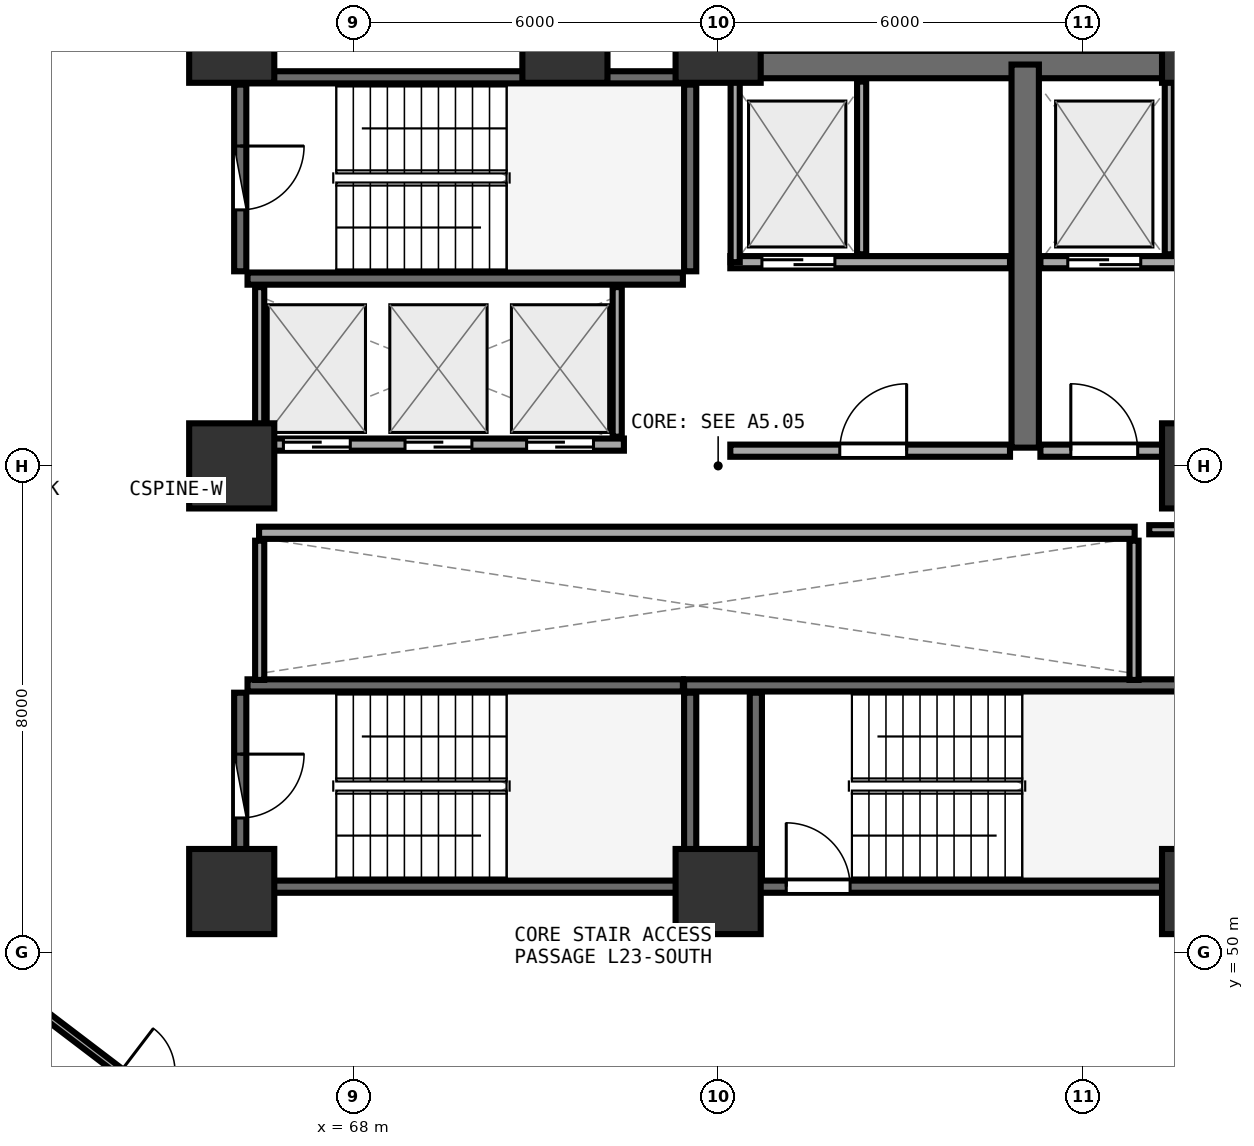
"""IFC4 building model, lengths in metres.
Left out: names, types, materials, properties, quantities, classifications, styles, units other than length and angle.
Written with IfcOpenShell. Run it as: python <this file> out.ifc"""

import sys

from ifc_helpers import new_model, si_unit, direction, frame, frame_2d, origin, origin_2d, place, context, subcontext, project, spatial, rectangle, extrude, element, fill, save


model = new_model("IFC4")
c1 = context("Model", 3, precision=1e-05, world=origin(), true_north=direction((0.0, 1.0)))
c2 = subcontext(c1, "Body", "Model", "MODEL_VIEW")
j1 = project(units=[si_unit("LENGTHUNIT", "METRE"), si_unit("PLANEANGLEUNIT", "RADIAN")], contexts=[c1])
p1 = place(None, origin())
s1 = spatial("IfcSite", under=j1, at=p1, CompositionType="ELEMENT")
p2 = place(p1, origin())
s2 = spatial("IfcBuilding", under=s1, at=p2, CompositionType="ELEMENT")
p3 = place(p2, frame((0.0, 0.0, 91.35)))
s3 = spatial("IfcBuildingStorey", under=s2, at=p3, CompositionType="ELEMENT", Elevation=91.35)
for number, where, z_axis, x_axis in (
    (1, (66.0, 51.0, 0.0), (0.0, 0.0, 1.0), (1.0, 0.0, 0.0)),
    (2, (74.0, 51.0, 0.0), (0.0, 0.0, 1.0), (1.0, 0.0, 0.0)),
    (3, (82.0, 51.0, 0.0), (0.0, 0.0, 1.0), (1.0, 0.0, 0.0)),
    (4, (82.0, 58.0, 0.0), (0.0, 0.0, 1.0), (1.0, 0.0, 0.0)),
    (5, (82.0, 65.0, 0.0), (0.0, 0.0, 1.0), (1.0, 0.0, 0.0)),
    (6, (74.0, 65.0, 0.0), (0.0, 0.0, 1.0), (1.0, 0.0, 0.0)),
    (7, (71.48, 65.0, 0.0), (0.0, 0.0, 1.0), (1.0, 0.0, 0.0)),
    (8, (66.0, 65.0, 0.0), (0.0, 0.0, 1.0), (1.0, 0.0, 0.0)),
    (9, (66.0, 58.0, 0.0), (0.0, 0.0, 1.0), (1.0, 0.0, 0.0)),
):
    element("IfcColumn", number, at=place(p3, frame(where, z_axis=z_axis, x_axis=x_axis)), inside=s3, PredefinedType="PILASTER", context=c2, shape_type="SweptSolid", body=[
        extrude(rectangle(XDim=1.4, YDim=1.4, at=origin_2d()), origin(), (0.0, 0.0, 1.0), 3.75),
    ])
p4 = place(p3, frame((66.26, 61.08, 0.0), z_axis=(0.0, 0.0, 1.0), x_axis=(1.0, 0.0, 0.0)))
e10 = element("IfcWall", 10, at=p4, inside=s3, PredefinedType="SHEAR", context=c2, shape_type="SweptSolid", body=[
    extrude(rectangle(XDim=7.16, YDim=0.2, at=frame_2d((3.58, 0.0))), origin(), (0.0, 0.0, 1.0), 3.49),
])
p5 = place(p3, frame((73.54, 61.2, 0.0), z_axis=(0.0, 0.0, 1.0), x_axis=(0.0, 1.0, 0.0)))
e11 = element("IfcWall", 11, at=p5, inside=s3, PredefinedType="SHEAR", context=c2, shape_type="SweptSolid", body=[
    extrude(rectangle(XDim=3.07, YDim=0.2, at=frame_2d((1.535, 0.0))), origin(), (0.0, 0.0, 1.0), 3.49),
])
p6 = place(p3, frame((73.42, 64.39, 0.0), z_axis=(0.0, 0.0, 1.0), x_axis=(-1.0, 0.0, 0.0)))
e12 = element("IfcWall", 12, at=p6, inside=s3, PredefinedType="SHEAR", context=c2, shape_type="SweptSolid", body=[
    extrude(rectangle(XDim=7.16, YDim=0.2, at=frame_2d((3.58, 0.0))), origin(), (0.0, 0.0, 1.0), 3.49),
])
p7 = place(p3, frame((66.14, 64.27, 0.0), z_axis=(0.0, 0.0, 1.0), x_axis=(0.0, -1.0, 0.0)))
e13 = element("IfcWall", 13, at=p7, inside=s3, PredefinedType="SHEAR", context=c2, shape_type="SweptSolid", body=[
    extrude(rectangle(XDim=3.07, YDim=0.2, at=frame_2d((1.535, 0.0))), origin(), (0.0, 0.0, 1.0), 3.49),
])
p8 = place(p7, frame((1.01, 0.0, 0.0)))
e14 = element("IfcOpeningElement", 14, at=p8, cuts=e13, PredefinedType="OPENING", context=c2, shape_type="SweptSolid", body=[
    extrude(rectangle(XDim=1.05, YDim=2.1, at=frame_2d((0.525, 1.05))), frame((0.0, 0.11, 0.0), z_axis=(0.0, -1.0, 0.0), x_axis=(1.0, 0.0, 0.0)), (0.0, 0.0, 1.0), 0.22),
])
p9 = place(p3, frame((74.0, 51.08, 0.0), z_axis=(0.0, 0.0, 1.0), x_axis=(1.0, 0.0, 0.0)))
e15 = element("IfcWall", 15, at=p9, inside=s3, PredefinedType="SHEAR", context=c2, shape_type="SweptSolid", body=[
    extrude(rectangle(XDim=7.9, YDim=0.2, at=frame_2d((3.95, 0.0))), origin(), (0.0, 0.0, 1.0), 3.49),
])
p10 = place(p9, frame((1.12, 0.0, 0.0)))
e16 = element("IfcOpeningElement", 16, at=p10, cuts=e15, PredefinedType="OPENING", context=c2, shape_type="SweptSolid", body=[
    extrude(rectangle(XDim=1.05, YDim=2.1, at=frame_2d((0.525, 1.05))), frame((0.0, 0.11, 0.0), z_axis=(0.0, -1.0, 0.0), x_axis=(1.0, 0.0, 0.0)), (0.0, 0.0, 1.0), 0.22),
])
p11 = place(p3, frame((81.9, 54.39, 0.0), z_axis=(0.0, 0.0, 1.0), x_axis=(-1.0, 0.0, 0.0)))
e17 = element("IfcWall", 17, at=p11, inside=s3, PredefinedType="SHEAR", context=c2, shape_type="SweptSolid", body=[
    extrude(rectangle(XDim=8.46, YDim=0.2, at=frame_2d((4.23, 0.0))), origin(), (0.0, 0.0, 1.0), 3.49),
])
p12 = place(p3, frame((74.62, 54.27, 0.0), z_axis=(0.0, 0.0, 1.0), x_axis=(0.0, -1.0, 0.0)))
e18 = element("IfcWall", 18, at=p12, inside=s3, PredefinedType="SHEAR", context=c2, shape_type="SweptSolid", body=[
    extrude(rectangle(XDim=3.07, YDim=0.2, at=frame_2d((1.535, 0.0))), origin(), (0.0, 0.0, 1.0), 3.49),
])
p13 = place(p3, frame((66.26, 51.08, 0.0), z_axis=(0.0, 0.0, 1.0), x_axis=(1.0, 0.0, 0.0)))
e19 = element("IfcWall", 19, at=p13, inside=s3, PredefinedType="SHEAR", context=c2, shape_type="SweptSolid", body=[
    extrude(rectangle(XDim=7.16, YDim=0.2, at=frame_2d((3.58, 0.0))), origin(), (0.0, 0.0, 1.0), 3.49),
])
p14 = place(p3, frame((73.54, 51.2, 0.0), z_axis=(0.0, 0.0, 1.0), x_axis=(0.0, 1.0, 0.0)))
e20 = element("IfcWall", 20, at=p14, inside=s3, PredefinedType="SHEAR", context=c2, shape_type="SweptSolid", body=[
    extrude(rectangle(XDim=3.07, YDim=0.2, at=frame_2d((1.535, 0.0))), origin(), (0.0, 0.0, 1.0), 3.49),
])
p15 = place(p3, frame((73.42, 54.39, 0.0), z_axis=(0.0, 0.0, 1.0), x_axis=(-1.0, 0.0, 0.0)))
e21 = element("IfcWall", 21, at=p15, inside=s3, PredefinedType="SHEAR", context=c2, shape_type="SweptSolid", body=[
    extrude(rectangle(XDim=7.16, YDim=0.2, at=frame_2d((3.58, 0.0))), origin(), (0.0, 0.0, 1.0), 3.49),
])
p16 = place(p3, frame((66.14, 54.27, 0.0), z_axis=(0.0, 0.0, 1.0), x_axis=(0.0, -1.0, 0.0)))
e22 = element("IfcWall", 22, at=p16, inside=s3, PredefinedType="SHEAR", context=c2, shape_type="SweptSolid", body=[
    extrude(rectangle(XDim=3.07, YDim=0.2, at=frame_2d((1.535, 0.0))), origin(), (0.0, 0.0, 1.0), 3.49),
])
p17 = place(p16, frame((1.01, 0.0, 0.0)))
e23 = element("IfcOpeningElement", 23, at=p17, cuts=e22, PredefinedType="OPENING", context=c2, shape_type="SweptSolid", body=[
    extrude(rectangle(XDim=1.05, YDim=2.1, at=frame_2d((0.525, 1.05))), frame((0.0, 0.11, 0.0), z_axis=(0.0, -1.0, 0.0), x_axis=(1.0, 0.0, 0.0)), (0.0, 0.0, 1.0), 0.22),
])
p18 = place(p3, frame((74.0, 64.6, 0.0), z_axis=(0.0, 0.0, 1.0), x_axis=(1.0, 0.0, 0.0)))
e24 = element("IfcWall", 24, at=p18, inside=s3, PredefinedType="SHEAR", context=c2, shape_type="SweptSolid", body=[
    extrude(rectangle(XDim=8.0, YDim=0.45, at=frame_2d((4.0, 0.0))), origin(), (0.0, 0.0, 1.0), 3.49),
])
p19 = place(p3, frame((79.05, 58.3, 0.0), z_axis=(0.0, 0.0, 1.0), x_axis=(0.0, 1.0, 0.0)))
e25 = element("IfcWall", 25, at=p19, inside=s3, PredefinedType="SHEAR", context=c2, shape_type="SweptSolid", body=[
    extrude(rectangle(XDim=6.3, YDim=0.45, at=frame_2d((3.15, 0.0))), origin(), (0.0, 0.0, 1.0), 3.49),
])
p20 = place(p3, frame((74.2, 61.35, 0.0), z_axis=(0.0, 0.0, 1.0), x_axis=(1.0, 0.0, 0.0)))
e26 = element("IfcWall", 26, at=p20, inside=s3, PredefinedType="SOLIDWALL", context=c2, shape_type="SweptSolid", body=[
    extrude(rectangle(XDim=4.6, YDim=0.2, at=frame_2d((2.3, 0.0))), origin(), (0.0, 0.0, 1.0), 3.48),
])
p21 = place(p20, frame((0.52, 0.0, 0.0)))
e27 = element("IfcOpeningElement", 27, at=p21, cuts=e26, PredefinedType="OPENING", context=c2, shape_type="SweptSolid", body=[
    extrude(rectangle(XDim=1.2, YDim=2.15, at=frame_2d((0.6, 1.075))), frame((0.0, 0.11, 0.0), z_axis=(0.0, -1.0, 0.0), x_axis=(1.0, 0.0, 0.0)), (0.0, 0.0, 1.0), 0.22),
])
p22 = place(p3, frame((74.28, 61.35, 0.0), z_axis=(0.0, 0.0, 1.0), x_axis=(0.0, 1.0, 0.0)))
e28 = element("IfcWall", 28, at=p22, inside=s3, PredefinedType="PARTITIONING", context=c2, shape_type="SweptSolid", body=[
    extrude(rectangle(XDim=2.97, YDim=0.15, at=frame_2d((1.485, 0.0))), origin(), (0.0, 0.0, 1.0), 3.48),
])
p23 = place(p3, frame((76.36, 61.48, 0.0), z_axis=(0.0, 0.0, 1.0), x_axis=(0.0, 1.0, 0.0)))
e29 = element("IfcWall", 29, at=p23, inside=s3, PredefinedType="PARTITIONING", context=c2, shape_type="SweptSolid", body=[
    extrude(rectangle(XDim=2.84, YDim=0.15, at=frame_2d((1.42, 0.0))), origin(), (0.0, 0.0, 1.0), 3.48),
])
p24 = place(p3, frame((79.3, 61.35, 0.0), z_axis=(0.0, 0.0, 1.0), x_axis=(1.0, 0.0, 0.0)))
e30 = element("IfcWall", 30, at=p24, inside=s3, PredefinedType="SOLIDWALL", context=c2, shape_type="SweptSolid", body=[
    extrude(rectangle(XDim=4.0, YDim=0.2, at=frame_2d((2.0, 0.0))), origin(), (0.0, 0.0, 1.0), 2.775),
])
p25 = place(p24, frame((0.45, 0.0, 0.0)))
e31 = element("IfcOpeningElement", 31, at=p25, cuts=e30, PredefinedType="OPENING", context=c2, shape_type="SweptSolid", body=[
    extrude(rectangle(XDim=1.2, YDim=2.15, at=frame_2d((0.6, 1.075))), frame((0.0, 0.11, 0.0), z_axis=(0.0, -1.0, 0.0), x_axis=(1.0, 0.0, 0.0)), (0.0, 0.0, 1.0), 0.22),
])
p26 = place(p3, frame((81.42, 61.48, 0.0), z_axis=(0.0, 0.0, 1.0), x_axis=(0.0, 1.0, 0.0)))
e32 = element("IfcWall", 32, at=p26, inside=s3, PredefinedType="PARTITIONING", context=c2, shape_type="SweptSolid", body=[
    extrude(rectangle(XDim=2.84, YDim=0.15, at=frame_2d((1.42, 0.0))), origin(), (0.0, 0.0, 1.0), 3.48),
])
p27 = place(p3, frame((74.2, 58.25, 0.0), z_axis=(0.0, 0.0, 1.0), x_axis=(1.0, 0.0, 0.0)))
e33 = element("IfcWall", 33, at=p27, inside=s3, PredefinedType="SOLIDWALL", context=c2, shape_type="SweptSolid", body=[
    extrude(rectangle(XDim=4.6, YDim=0.2, at=frame_2d((2.3, 0.0))), origin(), (0.0, 0.0, 1.0), 3.48),
])
p28 = place(p27, frame((1.8, 0.0, 0.0)))
e34 = element("IfcOpeningElement", 34, at=p28, cuts=e33, PredefinedType="OPENING", context=c2, shape_type="SweptSolid", body=[
    extrude(rectangle(XDim=1.1, YDim=2.1, at=frame_2d((0.55, 1.05))), frame((0.0, 0.11, 0.0), z_axis=(0.0, -1.0, 0.0), x_axis=(1.0, 0.0, 0.0)), (0.0, 0.0, 1.0), 0.22),
])
p29 = place(p3, frame((79.3, 58.25, 0.0), z_axis=(0.0, 0.0, 1.0), x_axis=(1.0, 0.0, 0.0)))
e35 = element("IfcWall", 35, at=p29, inside=s3, PredefinedType="SOLIDWALL", context=c2, shape_type="SweptSolid", body=[
    extrude(rectangle(XDim=4.0, YDim=0.2, at=frame_2d((2.0, 0.0))), origin(), (0.0, 0.0, 1.0), 2.775),
])
p30 = place(p29, frame((0.5, 0.0, 0.0)))
e36 = element("IfcOpeningElement", 36, at=p30, cuts=e35, PredefinedType="OPENING", context=c2, shape_type="SweptSolid", body=[
    extrude(rectangle(XDim=1.1, YDim=2.1, at=frame_2d((0.55, 1.05))), frame((0.0, 0.11, 0.0), z_axis=(0.0, -1.0, 0.0), x_axis=(1.0, 0.0, 0.0)), (0.0, 0.0, 1.0), 0.22),
])
p31 = place(p3, frame((66.45, 58.35, 0.0), z_axis=(0.0, 0.0, 1.0), x_axis=(1.0, 0.0, 0.0)))
e37 = element("IfcWall", 37, at=p31, inside=s3, PredefinedType="SOLIDWALL", context=c2, shape_type="SweptSolid", body=[
    extrude(rectangle(XDim=6.0, YDim=0.2, at=frame_2d((3.0, 0.0))), origin(), (0.0, 0.0, 1.0), 3.48),
])
p32 = place(p31, frame((0.4, 0.0, 0.0)))
e38 = element("IfcOpeningElement", 38, at=p32, cuts=e37, PredefinedType="OPENING", context=c2, shape_type="SweptSolid", body=[
    extrude(rectangle(XDim=1.1, YDim=2.1, at=frame_2d((0.55, 1.05))), frame((0.0, 0.11, 0.0), z_axis=(0.0, -1.0, 0.0), x_axis=(1.0, 0.0, 0.0)), (0.0, 0.0, 1.0), 0.22),
])
p33 = place(p31, frame((2.4, 0.0, 0.0)))
e39 = element("IfcOpeningElement", 39, at=p33, cuts=e37, PredefinedType="OPENING", context=c2, shape_type="SweptSolid", body=[
    extrude(rectangle(XDim=1.1, YDim=2.1, at=frame_2d((0.55, 1.05))), frame((0.0, 0.11, 0.0), z_axis=(0.0, -1.0, 0.0), x_axis=(1.0, 0.0, 0.0)), (0.0, 0.0, 1.0), 0.22),
])
p34 = place(p31, frame((4.4, 0.0, 0.0)))
e40 = element("IfcOpeningElement", 40, at=p34, cuts=e37, PredefinedType="OPENING", context=c2, shape_type="SweptSolid", body=[
    extrude(rectangle(XDim=1.1, YDim=2.1, at=frame_2d((0.55, 1.05))), frame((0.0, 0.11, 0.0), z_axis=(0.0, -1.0, 0.0), x_axis=(1.0, 0.0, 0.0)), (0.0, 0.0, 1.0), 0.22),
])
for number, where, z_axis, x_axis in (
    (41, (66.46, 58.48, 0.0), (0.0, 0.0, 1.0), (0.0, 1.0, 0.0)),
    (42, (72.34, 58.48, 0.0), (0.0, 0.0, 1.0), (0.0, 1.0, 0.0)),
):
    element("IfcWall", number, at=place(p3, frame(where, z_axis=z_axis, x_axis=x_axis)), inside=s3, PredefinedType="PARTITIONING", context=c2, shape_type="SweptSolid", body=[
        extrude(rectangle(XDim=2.46, YDim=0.15, at=frame_2d((1.23, 0.0))), origin(), (0.0, 0.0, 1.0), 3.48),
    ])
p35 = place(p3, frame((66.45, 56.9, 0.0), z_axis=(0.0, 0.0, 1.0), x_axis=(1.0, 0.0, 0.0)))
e43 = element("IfcWall", 43, at=p35, inside=s3, PredefinedType="SOLIDWALL", context=c2, shape_type="SweptSolid", body=[
    extrude(rectangle(XDim=14.4, YDim=0.2, at=frame_2d((7.2, 0.0))), origin(), (0.0, 0.0, 1.0), 3.48),
])
for number, where, z_axis, x_axis in (
    (44, (66.46, 54.48, 0.0), (0.0, 0.0, 1.0), (0.0, 1.0, 0.0)),
    (45, (80.84, 54.48, 0.0), (0.0, 0.0, 1.0), (0.0, 1.0, 0.0)),
):
    element("IfcWall", number, at=place(p3, frame(where, z_axis=z_axis, x_axis=x_axis)), inside=s3, PredefinedType="PARTITIONING", context=c2, shape_type="SweptSolid", body=[
        extrude(rectangle(XDim=2.29, YDim=0.15, at=frame_2d((1.145, 0.0))), origin(), (0.0, 0.0, 1.0), 3.48),
    ])
p36 = place(p3, frame((62.318, 49.442, 0.0), z_axis=(0.0, 0.0, 1.0), x_axis=(0.795762794985, -0.605608432997, 0.0)))
e46 = element("IfcWall", 46, at=p36, inside=s3, PredefinedType="PARTITIONING", context=c2, shape_type="SweptSolid", body=[
    extrude(rectangle(XDim=5.55, YDim=0.12, at=frame_2d((2.775, 0.0))), origin(), (0.0, 0.0, 1.0), 2.925),
])
p37 = place(p36, frame((2.325, 0.0, 0.0)))
e47 = element("IfcOpeningElement", 47, at=p37, cuts=e46, PredefinedType="OPENING", context=c2, shape_type="SweptSolid", body=[
    extrude(rectangle(XDim=0.9, YDim=2.08, at=frame_2d((0.45, 1.04))), frame((0.0, 0.07, 0.0), z_axis=(0.0, -1.0, 0.0), x_axis=(1.0, 0.0, 0.0)), (0.0, 0.0, 1.0), 0.14),
])
p38 = place(p3, frame((82.64, 56.95, 0.0), z_axis=(0.0, 0.0, 1.0), x_axis=(-1.0, 0.0, 0.0)))
e48 = element("IfcWall", 48, at=p38, inside=s3, PredefinedType="PARTITIONING", context=c2, shape_type="SweptSolid", body=[
    extrude(rectangle(XDim=1.55, YDim=0.15, at=frame_2d((0.775, 0.0))), origin(), (0.0, 0.0, 1.0), 2.775),
])
p39 = place(p8, origin())
e49 = element("IfcDoor", 49, at=p39, inside=s3, OperationType="SINGLE_SWING_LEFT", PredefinedType="DOOR", context=c2, shape_type="SweptSolid", body=[
    extrude(rectangle(XDim=1.05, YDim=2.1, at=frame_2d((0.525, 1.05))), frame((0.0, 0.025, 0.0), z_axis=(0.0, -1.0, 0.0), x_axis=(1.0, 0.0, 0.0)), (0.0, 0.0, 1.0), 0.05),
])
fill(e14, e49)
p40 = place(p10, origin())
e50 = element("IfcDoor", 50, at=p40, inside=s3, OperationType="SINGLE_SWING_LEFT", PredefinedType="DOOR", context=c2, shape_type="SweptSolid", body=[
    extrude(rectangle(XDim=1.05, YDim=2.1, at=frame_2d((0.525, 1.05))), frame((0.0, 0.025, 0.0), z_axis=(0.0, -1.0, 0.0), x_axis=(1.0, 0.0, 0.0)), (0.0, 0.0, 1.0), 0.05),
])
fill(e16, e50)
p41 = place(p17, origin())
e51 = element("IfcDoor", 51, at=p41, inside=s3, OperationType="SINGLE_SWING_LEFT", PredefinedType="DOOR", context=c2, shape_type="SweptSolid", body=[
    extrude(rectangle(XDim=1.05, YDim=2.1, at=frame_2d((0.525, 1.05))), frame((0.0, 0.025, 0.0), z_axis=(0.0, -1.0, 0.0), x_axis=(1.0, 0.0, 0.0)), (0.0, 0.0, 1.0), 0.05),
])
fill(e23, e51)
p42 = place(p21, origin())
e52 = element("IfcDoor", 52, at=p42, inside=s3, OperationType="DOUBLE_DOOR_SLIDING", PredefinedType="DOOR", context=c2, shape_type="SweptSolid", body=[
    extrude(rectangle(XDim=1.2, YDim=2.15, at=frame_2d((0.6, 1.075))), frame((0.0, 0.025, 0.0), z_axis=(0.0, -1.0, 0.0), x_axis=(1.0, 0.0, 0.0)), (0.0, 0.0, 1.0), 0.05),
])
fill(e27, e52)
p43 = place(p25, origin())
e53 = element("IfcDoor", 53, at=p43, inside=s3, OperationType="DOUBLE_DOOR_SLIDING", PredefinedType="DOOR", context=c2, shape_type="SweptSolid", body=[
    extrude(rectangle(XDim=1.2, YDim=2.15, at=frame_2d((0.6, 1.075))), frame((0.0, 0.025, 0.0), z_axis=(0.0, -1.0, 0.0), x_axis=(1.0, 0.0, 0.0)), (0.0, 0.0, 1.0), 0.05),
])
fill(e31, e53)
p44 = place(p28, frame((1.1, 0.0, 0.0), z_axis=(0.0, 0.0, 1.0), x_axis=(-1.0, 0.0, 0.0)))
e54 = element("IfcDoor", 54, at=p44, inside=s3, OperationType="SINGLE_SWING_LEFT", PredefinedType="DOOR", context=c2, shape_type="SweptSolid", body=[
    extrude(rectangle(XDim=1.1, YDim=2.1, at=frame_2d((0.55, 1.05))), frame((0.0, 0.025, 0.0), z_axis=(0.0, -1.0, 0.0), x_axis=(1.0, 0.0, 0.0)), (0.0, 0.0, 1.0), 0.05),
])
fill(e34, e54)
p45 = place(p30, frame((1.1, 0.0, 0.0), z_axis=(0.0, 0.0, 1.0), x_axis=(-1.0, 0.0, 0.0)))
e55 = element("IfcDoor", 55, at=p45, inside=s3, OperationType="SINGLE_SWING_RIGHT", PredefinedType="DOOR", context=c2, shape_type="SweptSolid", body=[
    extrude(rectangle(XDim=1.1, YDim=2.1, at=frame_2d((0.55, 1.05))), frame((0.0, 0.025, 0.0), z_axis=(0.0, -1.0, 0.0), x_axis=(1.0, 0.0, 0.0)), (0.0, 0.0, 1.0), 0.05),
])
fill(e36, e55)
p46 = place(p32, origin())
e56 = element("IfcDoor", 56, at=p46, inside=s3, OperationType="DOUBLE_DOOR_SLIDING", PredefinedType="DOOR", context=c2, shape_type="SweptSolid", body=[
    extrude(rectangle(XDim=1.1, YDim=2.1, at=frame_2d((0.55, 1.05))), frame((0.0, 0.025, 0.0), z_axis=(0.0, -1.0, 0.0), x_axis=(1.0, 0.0, 0.0)), (0.0, 0.0, 1.0), 0.05),
])
fill(e38, e56)
p47 = place(p33, origin())
e57 = element("IfcDoor", 57, at=p47, inside=s3, OperationType="DOUBLE_DOOR_SLIDING", PredefinedType="DOOR", context=c2, shape_type="SweptSolid", body=[
    extrude(rectangle(XDim=1.1, YDim=2.1, at=frame_2d((0.55, 1.05))), frame((0.0, 0.025, 0.0), z_axis=(0.0, -1.0, 0.0), x_axis=(1.0, 0.0, 0.0)), (0.0, 0.0, 1.0), 0.05),
])
fill(e39, e57)
p48 = place(p34, origin())
e58 = element("IfcDoor", 58, at=p48, inside=s3, OperationType="DOUBLE_DOOR_SLIDING", PredefinedType="DOOR", context=c2, shape_type="SweptSolid", body=[
    extrude(rectangle(XDim=1.1, YDim=2.1, at=frame_2d((0.55, 1.05))), frame((0.0, 0.025, 0.0), z_axis=(0.0, -1.0, 0.0), x_axis=(1.0, 0.0, 0.0)), (0.0, 0.0, 1.0), 0.05),
])
fill(e40, e58)
save(model, sys.argv[1])
